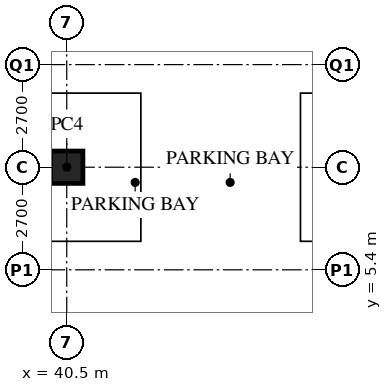
"""IFC4 building model, lengths in metres.
Left out: names, types, materials, properties, quantities, classifications, styles, units other than length and angle.
Written with IfcOpenShell. Run it as: python <this file> out.ifc"""

import sys

from ifc_helpers import new_model, si_unit, direction, frame, origin, origin_2d, place, context, subcontext, project, spatial, hollow_rectangle, extrude, element, save


model = new_model("IFC4")
c1 = context("Model", 3, precision=1e-05, world=origin(), true_north=direction((0.0, 1.0)))
c2 = subcontext(c1, "Body", "Model", "MODEL_VIEW")
j1 = project(units=[si_unit("LENGTHUNIT", "METRE"), si_unit("PLANEANGLEUNIT", "RADIAN")], contexts=[c1])
p1 = place(None, origin())
s1 = spatial("IfcSite", under=j1, at=p1, CompositionType="ELEMENT")
p2 = place(p1, origin())
s2 = spatial("IfcBuilding", under=s1, at=p2, CompositionType="ELEMENT")
p3 = place(p2, frame((0.0, 0.0, -8.4)))
s3 = spatial("IfcBuildingStorey", under=s2, at=p3, CompositionType="ELEMENT", Elevation=-8.4)
p4 = place(p3, frame((40.5, 8.1, 0.0), z_axis=(0.0, 0.0, 1.0), x_axis=(1.0, 0.0, 0.0)))
e1 = element("IfcColumn", 1, at=p4, inside=s3, PredefinedType="COLUMN", context=c2, shape_type="SweptSolid", body=[
    extrude(hollow_rectangle(XDim=0.85, YDim=0.85, WallThickness=0.085, at=origin_2d()), origin(), (0.0, 0.0, 1.0), 4.2),
])
save(model, sys.argv[1])
